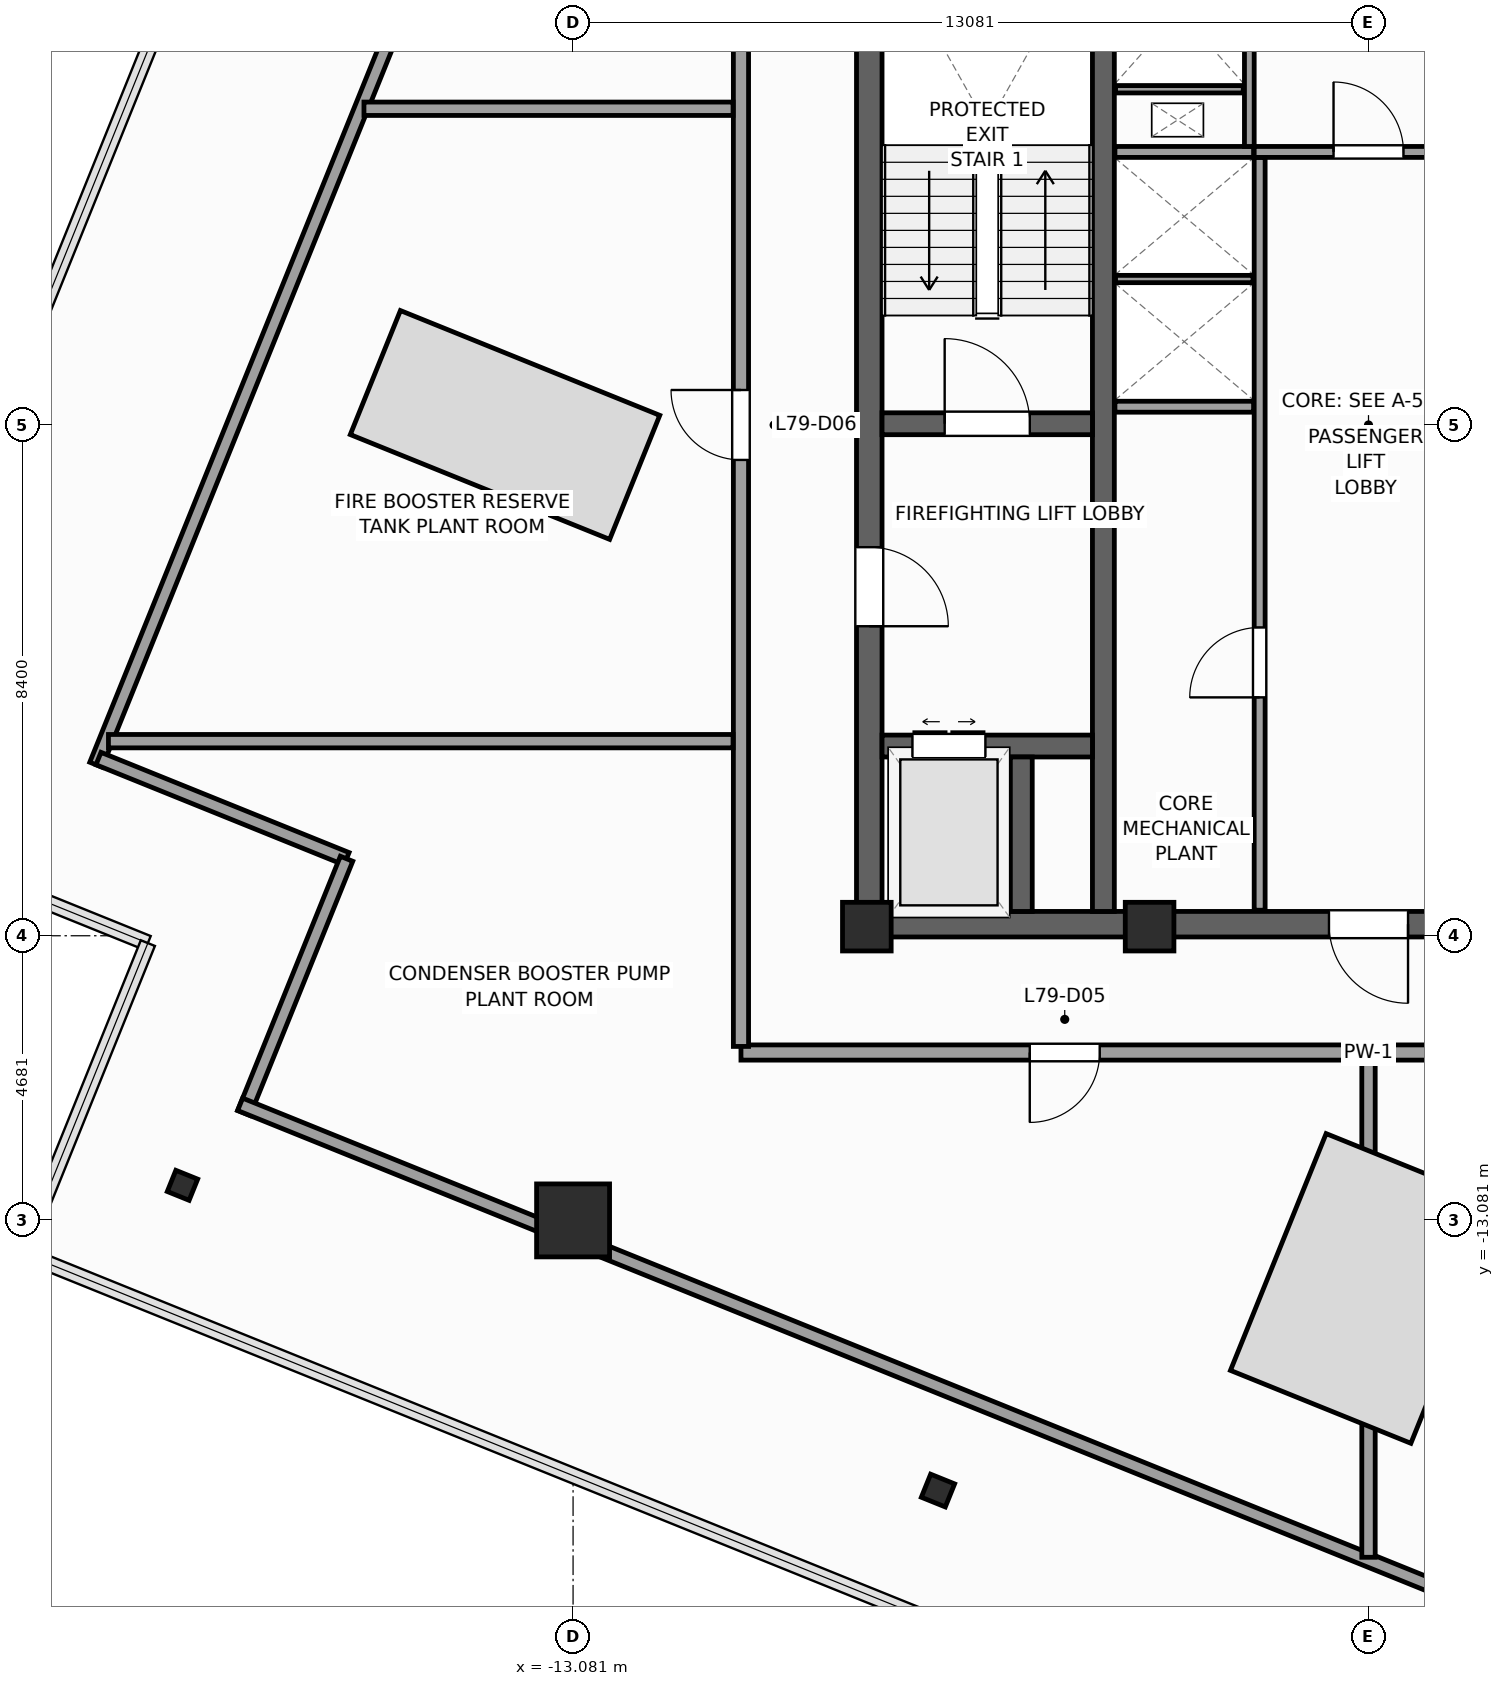
"""IFC4 building model, lengths in metres.
Left out: names, types, materials, properties, quantities, classifications, styles, units other than length and angle.
Written with IfcOpenShell. Run it as: python <this file> out.ifc"""

import sys

from ifc_helpers import new_model, si_unit, direction, frame, frame_2d, origin, origin_2d, place, context, subcontext, project, spatial, rectangle, i_section, extrude, source, transform, mapped, element, fill, save


model = new_model("IFC4")
c1 = context("Model", 3, precision=1e-05, world=origin(), true_north=direction((0.0, 1.0)))
c2 = subcontext(c1, "Body", "Model", "MODEL_VIEW")
j1 = project(units=[si_unit("LENGTHUNIT", "METRE"), si_unit("PLANEANGLEUNIT", "RADIAN")], contexts=[c1])
p1 = place(None, origin())
s1 = spatial("IfcSite", under=j1, at=p1, CompositionType="ELEMENT")
p2 = place(p1, origin())
s2 = spatial("IfcBuilding", under=s1, at=p2, CompositionType="ELEMENT")
p3 = place(p2, frame((0.0, 0.0, 321.6)))
s3 = spatial("IfcBuildingStorey", under=s2, at=p3, CompositionType="ELEMENT", Elevation=321.6)
p4 = place(p3, frame((-8.42, -8.21, 0.0), z_axis=(0.0, 0.0, 1.0), x_axis=(1.0, 0.0, 0.0)))
e1 = element("IfcWall", 1, at=p4, inside=s3, PredefinedType="SHEAR", context=c2, shape_type="SweptSolid", body=[
    extrude(rectangle(XDim=16.84, YDim=0.42, at=frame_2d((8.42, 0.0))), origin(), (0.0, 0.0, 1.0), 4.0),
])
p5 = place(p4, frame((7.77, 0.0, 0.0)))
e2 = element("IfcOpeningElement", 2, at=p5, cuts=e1, PredefinedType="OPENING", context=c2, shape_type="SweptSolid", body=[
    extrude(rectangle(XDim=1.3, YDim=2.2, at=frame_2d((0.65, 1.1))), frame((0.0, 0.22, 0.0), z_axis=(0.0, -1.0, 0.0), x_axis=(1.0, 0.0, 0.0)), (0.0, 0.0, 1.0), 0.44),
])
p6 = place(p3, frame((-8.21, -8.0, 0.0), z_axis=(0.0, 0.0, 1.0), x_axis=(0.0, 1.0, 0.0)))
e3 = element("IfcWall", 3, at=p6, inside=s3, PredefinedType="SHEAR", context=c2, shape_type="SweptSolid", body=[
    extrude(rectangle(XDim=16.0, YDim=0.42, at=frame_2d((8.0, 0.0))), origin(), (0.0, 0.0, 1.0), 4.0),
])
p7 = place(p6, frame((4.69, 0.0, 0.0)))
e4 = element("IfcOpeningElement", 4, at=p7, cuts=e3, PredefinedType="OPENING", context=c2, shape_type="SweptSolid", body=[
    extrude(rectangle(XDim=1.3, YDim=2.2, at=frame_2d((0.65, 1.1))), frame((0.0, 0.22, 0.0), z_axis=(0.0, -1.0, 0.0), x_axis=(1.0, 0.0, 0.0)), (0.0, 0.0, 1.0), 0.44),
])
p8 = place(p3, frame((-4.36, -8.0, 0.0), z_axis=(0.0, 0.0, 1.0), x_axis=(0.0, 1.0, 0.0)))
e5 = element("IfcWall", 5, at=p8, inside=s3, PredefinedType="SHEAR", context=c2, shape_type="SweptSolid", body=[
    extrude(rectangle(XDim=16.0, YDim=0.36, at=frame_2d((8.0, 0.0))), origin(), (0.0, 0.0, 1.0), 4.0),
])
p9 = place(p3, frame((-8.0, 0.02, 0.0), z_axis=(0.0, 0.0, 1.0), x_axis=(1.0, 0.0, 0.0)))
e6 = element("IfcWall", 6, at=p9, inside=s3, PredefinedType="SHEAR", context=c2, shape_type="SweptSolid", body=[
    extrude(rectangle(XDim=3.46, YDim=0.36, at=frame_2d((1.73, 0.0))), origin(), (0.0, 0.0, 1.0), 4.0),
])
p10 = place(p9, frame((1.03, 0.0, 0.0)))
e7 = element("IfcOpeningElement", 7, at=p10, cuts=e6, PredefinedType="OPENING", context=c2, shape_type="SweptSolid", body=[
    extrude(rectangle(XDim=1.4, YDim=2.2, at=frame_2d((0.7, 1.1))), frame((0.0, 0.19, 0.0), z_axis=(0.0, -1.0, 0.0), x_axis=(1.0, 0.0, 0.0)), (0.0, 0.0, 1.0), 0.38),
])
p11 = place(p3, frame((-8.0, -5.28, 0.0), z_axis=(0.0, 0.0, 1.0), x_axis=(1.0, 0.0, 0.0)))
e8 = element("IfcWall", 8, at=p11, inside=s3, PredefinedType="SHEAR", context=c2, shape_type="SweptSolid", body=[
    extrude(rectangle(XDim=3.46, YDim=0.36, at=frame_2d((1.73, 0.0))), origin(), (0.0, 0.0, 1.0), 4.0),
])
p12 = place(p11, frame((0.5, 0.0, 0.0)))
e9 = element("IfcOpeningElement", 9, at=p12, cuts=e8, PredefinedType="OPENING", context=c2, shape_type="SweptSolid", body=[
    extrude(rectangle(XDim=1.2, YDim=2.25, at=frame_2d((0.6, 1.125))), frame((0.0, 0.19, 0.0), z_axis=(0.0, -1.0, 0.0), x_axis=(1.0, 0.0, 0.0)), (0.0, 0.0, 1.0), 0.38),
])
p13 = place(p3, frame((-5.71, -8.0, 0.0), z_axis=(0.0, 0.0, 1.0), x_axis=(0.0, 1.0, 0.0)))
e10 = element("IfcWall", 10, at=p13, inside=s3, PredefinedType="SHEAR", context=c2, shape_type="SweptSolid", body=[
    extrude(rectangle(XDim=2.54, YDim=0.36, at=frame_2d((1.27, 0.0))), origin(), (0.0, 0.0, 1.0), 4.0),
])
m1 = source(origin(), c2, "Body", "SweptSolid", [
    extrude(rectangle(XDim=0.8, YDim=0.8, at=origin_2d()), origin(), (0.0, 0.0, 1.0), 4.0),
])
for number, where, z_axis, x_axis in (
    (11, (-8.25, -8.25, 0.0), (0.0, 0.0, 1.0), (1.0, 0.0, 0.0)),
    (12, (-3.6, -8.25, 0.0), (0.0, 0.0, 1.0), (1.0, 0.0, 0.0)),
):
    element("IfcColumn", number, at=place(p3, frame(where, z_axis=z_axis, x_axis=x_axis)), inside=s3, PredefinedType="PILASTER", context=c2, shape_type="MappedRepresentation", body=[
        mapped(m1, transform((0.0, 0.0, 0.0), scale=1.0)),
    ])
m2 = source(origin(), c2, "Body", "SweptSolid", [
    extrude(rectangle(XDim=1.2, YDim=1.2, at=origin_2d()), origin(), (0.0, 0.0, 1.0), 4.0),
])
p14 = place(p3, frame((-13.081, -13.081, 0.0), z_axis=(0.0, 0.0, 1.0), x_axis=(1.0, 0.0, 0.0)))
e13 = element("IfcColumn", 13, at=p14, inside=s3, PredefinedType="COLUMN", context=c2, shape_type="MappedRepresentation", body=[
    mapped(m2, transform((0.0, 0.0, 0.0), scale=1.0)),
])
m3 = source(origin(), c2, "Body", "SweptSolid", [
    extrude(i_section(OverallWidth=0.376, OverallDepth=0.387, WebThickness=0.02, FlangeThickness=0.032, FilletRadius=0.015, at=origin_2d()), origin(), (0.0, 0.0, 1.0), 4.0),
])
p15 = place(p3, frame((-19.504, -12.504, 0.0), z_axis=(0.0, 0.0, 1.0), x_axis=(0.374606593416, 0.927183854567, 0.0)))
e14 = element("IfcColumn", 14, at=p15, inside=s3, PredefinedType="COLUMN", context=c2, shape_type="MappedRepresentation", body=[
    mapped(m3, transform((0.0, 0.0, 0.0), scale=1.0)),
])
m4 = source(origin(), c2, "Body", "SweptSolid", [
    extrude(i_section(OverallWidth=0.409, OverallDepth=0.425, WebThickness=0.024, FlangeThickness=0.039, FilletRadius=0.015, at=origin_2d()), origin(), (0.0, 0.0, 1.0), 4.0),
])
p16 = place(p3, frame((-7.08, -17.524, 0.0), z_axis=(0.0, 0.0, 1.0), x_axis=(0.374606593416, 0.927183854567, 0.0)))
e15 = element("IfcColumn", 15, at=p16, inside=s3, PredefinedType="COLUMN", context=c2, shape_type="MappedRepresentation", body=[
    mapped(m4, transform((0.0, 0.0, 0.0), scale=1.0)),
])
p17 = place(p3, frame((-1.79, -7.98, 0.0), z_axis=(0.0, 0.0, 1.0), x_axis=(0.0, 1.0, 0.0)))
e16 = element("IfcWall", 16, at=p17, inside=s3, PredefinedType="PARTITIONING", context=c2, shape_type="SweptSolid", body=[
    extrude(rectangle(XDim=12.38, YDim=0.18, at=frame_2d((6.19, 0.0))), origin(), (0.0, 0.0, 1.0), 3.7),
])
p18 = place(p17, frame((3.5, 0.0, 0.0)))
e17 = element("IfcOpeningElement", 17, at=p18, cuts=e16, PredefinedType="OPENING", context=c2, shape_type="SweptSolid", body=[
    extrude(rectangle(XDim=1.15, YDim=2.25, at=frame_2d((0.575, 1.125))), frame((0.0, 0.1, 0.0), z_axis=(0.0, -1.0, 0.0), x_axis=(1.0, 0.0, 0.0)), (0.0, 0.0, 1.0), 0.2),
])
p19 = place(p3, frame((-1.88, 4.49, 0.0), z_axis=(0.0, 0.0, 1.0), x_axis=(1.0, 0.0, 0.0)))
e18 = element("IfcWall", 18, at=p19, inside=s3, PredefinedType="PARTITIONING", context=c2, shape_type="SweptSolid", body=[
    extrude(rectangle(XDim=3.76, YDim=0.18, at=frame_2d((1.88, 0.0))), origin(), (0.0, 0.0, 1.0), 3.7),
])
p20 = place(p19, frame((1.305, 0.0, 0.0)))
e19 = element("IfcOpeningElement", 19, at=p20, cuts=e18, PredefinedType="OPENING", context=c2, shape_type="SweptSolid", body=[
    extrude(rectangle(XDim=1.15, YDim=2.25, at=frame_2d((0.575, 1.125))), frame((0.0, 0.1, 0.0), z_axis=(0.0, -1.0, 0.0), x_axis=(1.0, 0.0, 0.0)), (0.0, 0.0, 1.0), 0.2),
])
for number, where, z_axis, x_axis in (
    (20, (-4.17, 0.3, 0.0), (0.0, 0.0, 1.0), (1.0, 0.0, 0.0)),
    (21, (-4.17, 4.49, 0.0), (0.0, 0.0, 1.0), (1.0, 0.0, 0.0)),
):
    element("IfcWall", number, at=place(p3, frame(where, z_axis=z_axis, x_axis=x_axis)), inside=s3, PredefinedType="PARTITIONING", context=c2, shape_type="SweptSolid", body=[
        extrude(rectangle(XDim=2.28, YDim=0.18, at=frame_2d((1.14, 0.0))), origin(), (0.0, 0.0, 1.0), 3.7),
    ])
p21 = place(p3, frame((-4.16, 2.4, 0.0), z_axis=(0.0, 0.0, 1.0), x_axis=(1.0, 0.0, 0.0)))
e22 = element("IfcWall", 22, at=p21, inside=s3, PredefinedType="PARTITIONING", context=c2, shape_type="SweptSolid", body=[
    extrude(rectangle(XDim=2.26, YDim=0.12, at=frame_2d((1.13, 0.0))), origin(), (0.0, 0.0, 1.0), 3.7),
])
p22 = place(p3, frame((-1.96, 4.58, 0.0), z_axis=(0.0, 0.0, 1.0), x_axis=(0.0, 1.0, 0.0)))
e23 = element("IfcWall", 23, at=p22, inside=s3, PredefinedType="PARTITIONING", context=c2, shape_type="SweptSolid", body=[
    extrude(rectangle(XDim=3.4, YDim=0.16, at=frame_2d((1.7, 0.0))), origin(), (0.0, 0.0, 1.0), 3.7),
])
p23 = place(p3, frame((-4.16, 5.52, 0.0), z_axis=(0.0, 0.0, 1.0), x_axis=(1.0, 0.0, 0.0)))
e24 = element("IfcWall", 24, at=p23, inside=s3, PredefinedType="PARTITIONING", context=c2, shape_type="SweptSolid", body=[
    extrude(rectangle(XDim=2.1, YDim=0.12, at=frame_2d((1.05, 0.0))), origin(), (0.0, 0.0, 1.0), 3.7),
])
p24 = place(p3, frame((-11.172, 18.556, 0.0), z_axis=(0.0, 0.0, 1.0), x_axis=(-0.374611707018, -0.927181788521, 0.0)))
e25 = element("IfcWall", 25, at=p24, inside=s3, PredefinedType="PARTITIONING", context=c2, shape_type="SweptSolid", body=[
    extrude(rectangle(XDim=26.04, YDim=0.22, at=frame_2d((13.02, 0.0))), origin(), (0.0, 0.0, 1.0), 3.05),
])
p25 = place(p3, frame((-20.886, -5.486, 0.0), z_axis=(0.0, 0.0, 1.0), x_axis=(0.927189216671, -0.374593321469, 0.0)))
e26 = element("IfcWall", 26, at=p25, inside=s3, PredefinedType="PARTITIONING", context=c2, shape_type="SweptSolid", body=[
    extrude(rectangle(XDim=4.4, YDim=0.22, at=frame_2d((2.2, 0.0))), origin(), (0.0, 0.0, 1.0), 3.7),
])
p26 = place(p3, frame((-16.806, -7.134, 0.0), z_axis=(0.0, 0.0, 1.0), x_axis=(-0.374599091925, -0.927186885331, 0.0)))
e27 = element("IfcWall", 27, at=p26, inside=s3, PredefinedType="PARTITIONING", context=c2, shape_type="SweptSolid", body=[
    extrude(rectangle(XDim=4.51, YDim=0.22, at=frame_2d((2.255, 0.0))), origin(), (0.0, 0.0, 1.0), 3.7),
])
p27 = place(p3, frame((-18.556, -11.172, 0.0), z_axis=(0.0, 0.0, 1.0), x_axis=(0.927181788521, -0.374611707018, 0.0)))
e28 = element("IfcWall", 28, at=p27, inside=s3, PredefinedType="PARTITIONING", context=c2, shape_type="SweptSolid", body=[
    extrude(rectangle(XDim=26.04, YDim=0.22, at=frame_2d((13.02, 0.0))), origin(), (0.0, 0.0, 1.0), 3.05),
])
p28 = place(p3, frame((-10.32, -10.32, 0.0), z_axis=(0.0, 0.0, 1.0), x_axis=(1.0, 0.0, 0.0)))
e29 = element("IfcWall", 29, at=p28, inside=s3, PredefinedType="PARTITIONING", context=c2, shape_type="SweptSolid", body=[
    extrude(rectangle(XDim=20.64, YDim=0.25, at=frame_2d((10.32, 0.0))), origin(), (0.0, 0.0, 1.0), 3.7),
])
p29 = place(p28, frame((14.74, 0.0, 0.0)))
e30 = element("IfcOpeningElement", 30, at=p29, cuts=e29, PredefinedType="OPENING", context=c2, shape_type="SweptSolid", body=[
    extrude(rectangle(XDim=1.15, YDim=2.25, at=frame_2d((0.575, 1.125))), frame((0.0, 0.135, 0.0), z_axis=(0.0, -1.0, 0.0), x_axis=(1.0, 0.0, 0.0)), (0.0, 0.0, 1.0), 0.27),
])
p30 = place(p28, frame((4.75, 0.0, 0.0)))
e31 = element("IfcOpeningElement", 31, at=p30, cuts=e29, PredefinedType="OPENING", context=c2, shape_type="SweptSolid", body=[
    extrude(rectangle(XDim=1.15, YDim=2.25, at=frame_2d((0.575, 1.125))), frame((0.0, 0.135, 0.0), z_axis=(0.0, -1.0, 0.0), x_axis=(1.0, 0.0, 0.0)), (0.0, 0.0, 1.0), 0.27),
])
p31 = place(p3, frame((-10.32, -10.22, 0.0), z_axis=(0.0, 0.0, 1.0), x_axis=(0.0, 1.0, 0.0)))
e32 = element("IfcWall", 32, at=p31, inside=s3, PredefinedType="PARTITIONING", context=c2, shape_type="SweptSolid", body=[
    extrude(rectangle(XDim=20.44, YDim=0.25, at=frame_2d((10.22, 0.0))), origin(), (0.0, 0.0, 1.0), 3.7),
])
p32 = place(p31, frame((9.645, 0.0, 0.0)))
e33 = element("IfcOpeningElement", 33, at=p32, cuts=e32, PredefinedType="OPENING", context=c2, shape_type="SweptSolid", body=[
    extrude(rectangle(XDim=1.15, YDim=2.25, at=frame_2d((0.575, 1.125))), frame((0.0, 0.135, 0.0), z_axis=(0.0, -1.0, 0.0), x_axis=(1.0, 0.0, 0.0)), (0.0, 0.0, 1.0), 0.27),
])
p33 = place(p3, frame((0.0, -10.45, 0.0), z_axis=(0.0, 0.0, 1.0), x_axis=(0.0, -1.0, 0.0)))
e34 = element("IfcWall", 34, at=p33, inside=s3, PredefinedType="PARTITIONING", context=c2, shape_type="SweptSolid", body=[
    extrude(rectangle(XDim=8.171, YDim=0.22, at=frame_2d((4.085, 0.0))), origin(), (0.0, 0.0, 1.0), 3.7),
])
p34 = place(p3, frame((-10.45, -5.2, 0.0), z_axis=(0.0, 0.0, 1.0), x_axis=(-1.0, 0.0, 0.0)))
e35 = element("IfcWall", 35, at=p34, inside=s3, PredefinedType="PARTITIONING", context=c2, shape_type="SweptSolid", body=[
    extrude(rectangle(XDim=10.272, YDim=0.22, at=frame_2d((5.136, 0.0))), origin(), (0.0, 0.0, 1.0), 3.7),
])
p35 = place(p3, frame((-10.45, 5.2, 0.0), z_axis=(0.0, 0.0, 1.0), x_axis=(-1.0, 0.0, 0.0)))
e36 = element("IfcWall", 36, at=p35, inside=s3, PredefinedType="PARTITIONING", context=c2, shape_type="SweptSolid", body=[
    extrude(rectangle(XDim=6.07, YDim=0.22, at=frame_2d((3.035, 0.0))), origin(), (0.0, 0.0, 1.0), 3.7),
])
m5 = source(origin(), c2, "Body", "SweptSolid", [
    extrude(rectangle(XDim=1.4, YDim=2.2, at=frame_2d((0.7, 1.1))), frame((0.0, 0.025, 0.0), z_axis=(0.0, -1.0, 0.0), x_axis=(1.0, 0.0, 0.0)), (0.0, 0.0, 1.0), 0.05),
])
p36 = place(p10, origin())
e37 = element("IfcDoor", 37, at=p36, inside=s3, OperationType="SINGLE_SWING_LEFT", PredefinedType="DOOR", context=c2, shape_type="MappedRepresentation", body=[
    mapped(m5, transform((0.0, 0.0, 0.0), scale=1.0)),
])
fill(e7, e37)
m6 = source(origin(), c2, "Body", "SweptSolid", [
    extrude(rectangle(XDim=1.3, YDim=2.2, at=frame_2d((0.65, 1.1))), frame((0.0, 0.025, 0.0), z_axis=(0.0, -1.0, 0.0), x_axis=(1.0, 0.0, 0.0)), (0.0, 0.0, 1.0), 0.05),
])
p37 = place(p7, frame((1.3, 0.0, 0.0), z_axis=(0.0, 0.0, 1.0), x_axis=(-1.0, 0.0, 0.0)))
e38 = element("IfcDoor", 38, at=p37, inside=s3, OperationType="SINGLE_SWING_LEFT", PredefinedType="DOOR", context=c2, shape_type="MappedRepresentation", body=[
    mapped(m6, transform((0.0, 0.0, 0.0), scale=1.0)),
])
fill(e4, e38)
p38 = place(p5, frame((1.3, 0.0, 0.0), z_axis=(0.0, 0.0, 1.0), x_axis=(-1.0, 0.0, 0.0)))
e39 = element("IfcDoor", 39, at=p38, inside=s3, OperationType="SINGLE_SWING_RIGHT", PredefinedType="DOOR", context=c2, shape_type="MappedRepresentation", body=[
    mapped(m6, transform((0.0, 0.0, 0.0), scale=1.0)),
])
fill(e2, e39)
m7 = source(origin(), c2, "Body", "SweptSolid", [
    extrude(rectangle(XDim=1.2, YDim=2.25, at=frame_2d((0.6, 1.125))), frame((0.0, 0.025, 0.0), z_axis=(0.0, -1.0, 0.0), x_axis=(1.0, 0.0, 0.0)), (0.0, 0.0, 1.0), 0.05),
])
p39 = place(p12, origin())
e40 = element("IfcDoor", 40, at=p39, inside=s3, OperationType="DOUBLE_DOOR_SLIDING", PredefinedType="DOOR", context=c2, shape_type="MappedRepresentation", body=[
    mapped(m7, transform((0.0, 0.0, 0.0), scale=1.0)),
])
fill(e9, e40)
m8 = source(origin(), c2, "Body", "SweptSolid", [
    extrude(rectangle(XDim=1.15, YDim=2.25, at=frame_2d((0.575, 1.125))), frame((0.0, 0.025, 0.0), z_axis=(0.0, -1.0, 0.0), x_axis=(1.0, 0.0, 0.0)), (0.0, 0.0, 1.0), 0.05),
])
p40 = place(p18, origin())
e41 = element("IfcDoor", 41, at=p40, inside=s3, OperationType="SINGLE_SWING_LEFT", PredefinedType="DOOR", context=c2, shape_type="MappedRepresentation", body=[
    mapped(m8, transform((0.0, 0.0, 0.0), scale=1.0)),
])
fill(e17, e41)
p41 = place(p20, origin())
e42 = element("IfcDoor", 42, at=p41, inside=s3, OperationType="SINGLE_SWING_LEFT", PredefinedType="DOOR", context=c2, shape_type="MappedRepresentation", body=[
    mapped(m8, transform((0.0, 0.0, 0.0), scale=1.0)),
])
fill(e19, e42)
p42 = place(p30, frame((1.15, 0.0, 0.0), z_axis=(0.0, 0.0, 1.0), x_axis=(-1.0, 0.0, 0.0)))
e43 = element("IfcDoor", 43, at=p42, inside=s3, OperationType="SINGLE_SWING_LEFT", PredefinedType="DOOR", context=c2, shape_type="MappedRepresentation", body=[
    mapped(m8, transform((0.0, 0.0, 0.0), scale=1.0)),
])
fill(e31, e43)
p43 = place(p32, origin())
e44 = element("IfcDoor", 44, at=p43, inside=s3, OperationType="SINGLE_SWING_RIGHT", PredefinedType="DOOR", context=c2, shape_type="MappedRepresentation", body=[
    mapped(m8, transform((0.0, 0.0, 0.0), scale=1.0)),
])
fill(e33, e44)
save(model, sys.argv[1])
